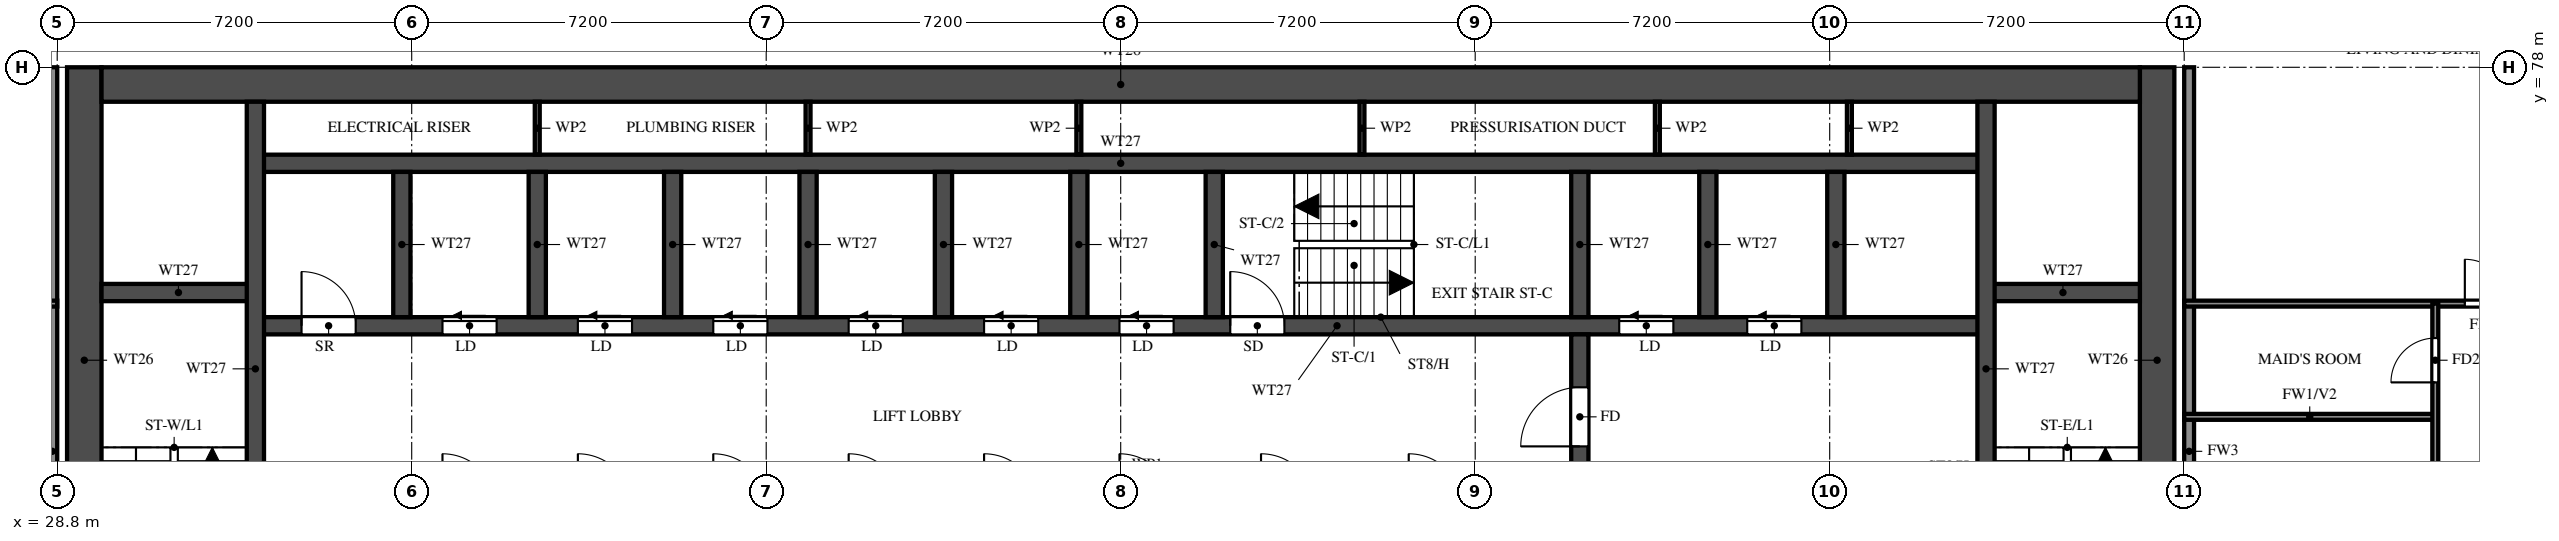
"""IFC4 building model, lengths in metres.
Left out: names, types, materials, properties, quantities, classifications, styles, units other than length and angle.
Written with IfcOpenShell. Run it as: python <this file> out.ifc"""

import sys

from ifc_helpers import new_model, si_unit, direction, frame, frame_2d, origin, place, context, subcontext, project, spatial, rectangle, extrude, element, fill, save


model = new_model("IFC4")
c1 = context("Model", 3, precision=1e-05, world=origin(), true_north=direction((0.0, 1.0)))
c2 = subcontext(c1, "Body", "Model", "MODEL_VIEW")
j1 = project(units=[si_unit("LENGTHUNIT", "METRE"), si_unit("PLANEANGLEUNIT", "RADIAN")], contexts=[c1])
p1 = place(None, origin())
s1 = spatial("IfcSite", under=j1, at=p1, CompositionType="ELEMENT")
p2 = place(p1, origin())
s2 = spatial("IfcBuilding", under=s1, at=p2, CompositionType="ELEMENT")
p3 = place(p2, frame((0.0, 0.0, 143.0)))
s3 = spatial("IfcBuildingStorey", under=s2, at=p3, CompositionType="ELEMENT", Elevation=143.0)
for number, where, z_axis, x_axis in (
    (1, (29.35, 66.1, 0.0), (0.0, 0.0, 1.0), (0.0, 1.0, 0.0)),
    (2, (71.45, 66.1, 0.0), (0.0, 0.0, 1.0), (0.0, 1.0, 0.0)),
):
    element("IfcWall", number, at=place(p3, frame(where, z_axis=z_axis, x_axis=x_axis)), inside=s3, PredefinedType="SHEAR", context=c2, shape_type="SweptSolid", body=[
        extrude(rectangle(XDim=11.9, YDim=0.7, at=frame_2d((5.95, 0.0))), origin(), (0.0, 0.0, 1.0), 3.2),
    ])
p4 = place(p3, frame((29.7, 77.65, 0.0), z_axis=(0.0, 0.0, 1.0), x_axis=(1.0, 0.0, 0.0)))
e3 = element("IfcWall", 3, at=p4, inside=s3, PredefinedType="SHEAR", context=c2, shape_type="SweptSolid", body=[
    extrude(rectangle(XDim=41.4, YDim=0.7, at=frame_2d((20.7, 0.0))), origin(), (0.0, 0.0, 1.0), 3.2),
])
p5 = place(p3, frame((32.825, 72.75, 0.0), z_axis=(0.0, 0.0, 1.0), x_axis=(1.0, 0.0, 0.0)))
e4 = element("IfcWall", 4, at=p5, inside=s3, PredefinedType="SHEAR", context=c2, shape_type="SweptSolid", body=[
    extrude(rectangle(XDim=35.15, YDim=0.35, at=frame_2d((17.575, 0.0))), origin(), (0.0, 0.0, 1.0), 3.2),
])
p6 = place(p5, frame((19.8, 0.0, 0.0)))
e5 = element("IfcOpeningElement", 5, at=p6, cuts=e4, PredefinedType="OPENING", context=c2, shape_type="SweptSolid", body=[
    extrude(rectangle(XDim=1.1, YDim=2.1, at=frame_2d((0.55, 1.05))), frame((0.0, 0.185, 0.0), z_axis=(0.0, -1.0, 0.0), x_axis=(1.0, 0.0, 0.0)), (0.0, 0.0, 1.0), 0.37),
])
p7 = place(p5, frame((27.7, 0.0, 0.0)))
e6 = element("IfcOpeningElement", 6, at=p7, cuts=e4, PredefinedType="OPENING", context=c2, shape_type="SweptSolid", body=[
    extrude(rectangle(XDim=1.1, YDim=2.1, at=frame_2d((0.55, 1.05))), frame((0.0, 0.185, 0.0), z_axis=(0.0, -1.0, 0.0), x_axis=(1.0, 0.0, 0.0)), (0.0, 0.0, 1.0), 0.37),
])
p8 = place(p5, frame((30.3, 0.0, 0.0)))
e7 = element("IfcOpeningElement", 7, at=p8, cuts=e4, PredefinedType="OPENING", context=c2, shape_type="SweptSolid", body=[
    extrude(rectangle(XDim=1.1, YDim=2.1, at=frame_2d((0.55, 1.05))), frame((0.0, 0.185, 0.0), z_axis=(0.0, -1.0, 0.0), x_axis=(1.0, 0.0, 0.0)), (0.0, 0.0, 1.0), 0.37),
])
p9 = place(p5, frame((3.8, 0.0, 0.0)))
e8 = element("IfcOpeningElement", 8, at=p9, cuts=e4, PredefinedType="OPENING", context=c2, shape_type="SweptSolid", body=[
    extrude(rectangle(XDim=1.1, YDim=2.1, at=frame_2d((0.55, 1.05))), frame((0.0, 0.185, 0.0), z_axis=(0.0, -1.0, 0.0), x_axis=(1.0, 0.0, 0.0)), (0.0, 0.0, 1.0), 0.37),
])
p10 = place(p5, frame((6.55, 0.0, 0.0)))
e9 = element("IfcOpeningElement", 9, at=p10, cuts=e4, PredefinedType="OPENING", context=c2, shape_type="SweptSolid", body=[
    extrude(rectangle(XDim=1.1, YDim=2.1, at=frame_2d((0.55, 1.05))), frame((0.0, 0.185, 0.0), z_axis=(0.0, -1.0, 0.0), x_axis=(1.0, 0.0, 0.0)), (0.0, 0.0, 1.0), 0.37),
])
p11 = place(p5, frame((9.3, 0.0, 0.0)))
e10 = element("IfcOpeningElement", 10, at=p11, cuts=e4, PredefinedType="OPENING", context=c2, shape_type="SweptSolid", body=[
    extrude(rectangle(XDim=1.1, YDim=2.1, at=frame_2d((0.55, 1.05))), frame((0.0, 0.185, 0.0), z_axis=(0.0, -1.0, 0.0), x_axis=(1.0, 0.0, 0.0)), (0.0, 0.0, 1.0), 0.37),
])
p12 = place(p5, frame((12.05, 0.0, 0.0)))
e11 = element("IfcOpeningElement", 11, at=p12, cuts=e4, PredefinedType="OPENING", context=c2, shape_type="SweptSolid", body=[
    extrude(rectangle(XDim=1.1, YDim=2.1, at=frame_2d((0.55, 1.05))), frame((0.0, 0.185, 0.0), z_axis=(0.0, -1.0, 0.0), x_axis=(1.0, 0.0, 0.0)), (0.0, 0.0, 1.0), 0.37),
])
p13 = place(p5, frame((14.8, 0.0, 0.0)))
e12 = element("IfcOpeningElement", 12, at=p13, cuts=e4, PredefinedType="OPENING", context=c2, shape_type="SweptSolid", body=[
    extrude(rectangle(XDim=1.1, YDim=2.1, at=frame_2d((0.55, 1.05))), frame((0.0, 0.185, 0.0), z_axis=(0.0, -1.0, 0.0), x_axis=(1.0, 0.0, 0.0)), (0.0, 0.0, 1.0), 0.37),
])
p14 = place(p5, frame((17.55, 0.0, 0.0)))
e13 = element("IfcOpeningElement", 13, at=p14, cuts=e4, PredefinedType="OPENING", context=c2, shape_type="SweptSolid", body=[
    extrude(rectangle(XDim=1.1, YDim=2.1, at=frame_2d((0.55, 1.05))), frame((0.0, 0.185, 0.0), z_axis=(0.0, -1.0, 0.0), x_axis=(1.0, 0.0, 0.0)), (0.0, 0.0, 1.0), 0.37),
])
p15 = place(p5, frame((0.938, 0.0, 0.0)))
e14 = element("IfcOpeningElement", 14, at=p15, cuts=e4, PredefinedType="OPENING", context=c2, shape_type="SweptSolid", body=[
    extrude(rectangle(XDim=1.1, YDim=2.1, at=frame_2d((0.55, 1.05))), frame((0.0, 0.185, 0.0), z_axis=(0.0, -1.0, 0.0), x_axis=(1.0, 0.0, 0.0)), (0.0, 0.0, 1.0), 0.37),
])
p16 = place(p3, frame((32.825, 76.05, 0.0), z_axis=(0.0, 0.0, 1.0), x_axis=(1.0, 0.0, 0.0)))
e15 = element("IfcWall", 15, at=p16, inside=s3, PredefinedType="SHEAR", context=c2, shape_type="SweptSolid", body=[
    extrude(rectangle(XDim=35.15, YDim=0.35, at=frame_2d((17.575, 0.0))), origin(), (0.0, 0.0, 1.0), 3.2),
])
for number, where, z_axis, x_axis in (
    (16, (29.7, 73.425, 0.0), (0.0, 0.0, 1.0), (1.0, 0.0, 0.0)),
    (17, (67.975, 73.425, 0.0), (0.0, 0.0, 1.0), (1.0, 0.0, 0.0)),
):
    element("IfcWall", number, at=place(p3, frame(where, z_axis=z_axis, x_axis=x_axis)), inside=s3, PredefinedType="SHEAR", context=c2, shape_type="SweptSolid", body=[
        extrude(rectangle(XDim=3.125, YDim=0.35, at=frame_2d((1.562, 0.0))), origin(), (0.0, 0.0, 1.0), 3.2),
    ])
p17 = place(p3, frame((32.825, 66.45, 0.0), z_axis=(0.0, 0.0, 1.0), x_axis=(0.0, 1.0, 0.0)))
e18 = element("IfcWall", 18, at=p17, inside=s3, PredefinedType="SHEAR", context=c2, shape_type="SweptSolid", body=[
    extrude(rectangle(XDim=10.85, YDim=0.35, at=frame_2d((5.425, 0.0))), origin(), (0.0, 0.0, 1.0), 3.2),
])
p18 = place(p3, frame((67.975, 66.45, 0.0), z_axis=(0.0, 0.0, 1.0), x_axis=(0.0, 1.0, 0.0)))
e19 = element("IfcWall", 19, at=p18, inside=s3, PredefinedType="SHEAR", context=c2, shape_type="SweptSolid", body=[
    extrude(rectangle(XDim=10.85, YDim=0.35, at=frame_2d((5.425, 0.0))), origin(), (0.0, 0.0, 1.0), 3.2),
])
p19 = place(p18, frame((0.15, 0.0, 0.0)))
e20 = element("IfcOpeningElement", 20, at=p19, cuts=e19, PredefinedType="OPENING", context=c2, shape_type="SweptSolid", body=[
    extrude(rectangle(XDim=1.1, YDim=2.1, at=frame_2d((0.55, 1.05))), frame((0.0, 0.185, 0.0), z_axis=(0.0, -1.0, 0.0), x_axis=(1.0, 0.0, 0.0)), (0.0, 0.0, 1.0), 0.37),
])
p20 = place(p3, frame((59.725, 66.45, 0.0), z_axis=(0.0, 0.0, 1.0), x_axis=(0.0, 1.0, 0.0)))
e21 = element("IfcWall", 21, at=p20, inside=s3, PredefinedType="SHEAR", context=c2, shape_type="SweptSolid", body=[
    extrude(rectangle(XDim=6.125, YDim=0.35, at=frame_2d((3.062, 0.0))), origin(), (0.0, 0.0, 1.0), 3.2),
])
p21 = place(p20, frame((3.85, 0.0, 0.0)))
e22 = element("IfcOpeningElement", 22, at=p21, cuts=e21, PredefinedType="OPENING", context=c2, shape_type="SweptSolid", body=[
    extrude(rectangle(XDim=1.2, YDim=2.1, at=frame_2d((0.6, 1.05))), frame((0.0, 0.185, 0.0), z_axis=(0.0, -1.0, 0.0), x_axis=(1.0, 0.0, 0.0)), (0.0, 0.0, 1.0), 0.37),
])
for number, where, z_axis, x_axis in (
    (23, (59.725, 72.925, 0.0), (0.0, 0.0, 1.0), (0.0, 1.0, 0.0)),
    (24, (35.8, 72.925, 0.0), (0.0, 0.0, 1.0), (0.0, 1.0, 0.0)),
    (25, (38.55, 72.925, 0.0), (0.0, 0.0, 1.0), (0.0, 1.0, 0.0)),
    (26, (41.3, 72.925, 0.0), (0.0, 0.0, 1.0), (0.0, 1.0, 0.0)),
    (27, (44.05, 72.925, 0.0), (0.0, 0.0, 1.0), (0.0, 1.0, 0.0)),
    (28, (46.8, 72.925, 0.0), (0.0, 0.0, 1.0), (0.0, 1.0, 0.0)),
    (29, (49.55, 72.925, 0.0), (0.0, 0.0, 1.0), (0.0, 1.0, 0.0)),
    (30, (52.3, 72.925, 0.0), (0.0, 0.0, 1.0), (0.0, 1.0, 0.0)),
    (31, (62.325, 72.925, 0.0), (0.0, 0.0, 1.0), (0.0, 1.0, 0.0)),
    (32, (64.925, 72.925, 0.0), (0.0, 0.0, 1.0), (0.0, 1.0, 0.0)),
):
    element("IfcWall", number, at=place(p3, frame(where, z_axis=z_axis, x_axis=x_axis)), inside=s3, PredefinedType="SHEAR", context=c2, shape_type="SweptSolid", body=[
        extrude(rectangle(XDim=2.95, YDim=0.35, at=frame_2d((1.475, 0.0))), origin(), (0.0, 0.0, 1.0), 3.2),
    ])
for number, where, z_axis, x_axis in (
    (33, (38.55, 76.225, 0.0), (0.0, 0.0, 1.0), (0.0, 1.0, 0.0)),
    (34, (44.05, 76.225, 0.0), (0.0, 0.0, 1.0), (0.0, 1.0, 0.0)),
    (35, (49.55, 76.225, 0.0), (0.0, 0.0, 1.0), (0.0, 1.0, 0.0)),
    (36, (55.3, 76.225, 0.0), (0.0, 0.0, 1.0), (0.0, 1.0, 0.0)),
    (37, (61.3, 76.225, 0.0), (0.0, 0.0, 1.0), (0.0, 1.0, 0.0)),
    (38, (65.2, 76.225, 0.0), (0.0, 0.0, 1.0), (0.0, 1.0, 0.0)),
):
    element("IfcWall", number, at=place(p3, frame(where, z_axis=z_axis, x_axis=x_axis)), inside=s3, PredefinedType="PARTITIONING", context=c2, shape_type="SweptSolid", body=[
        extrude(rectangle(XDim=1.075, YDim=0.1, at=frame_2d((0.538, 0.0))), origin(), (0.0, 0.0, 1.0), 3.2),
    ])
for number, where, z_axis, x_axis in (
    (39, (28.7, 62.4, 0.0), (0.0, 0.0, 1.0), (0.0, 1.0, 0.0)),
    (40, (72.1, 62.4, 0.0), (0.0, 0.0, 1.0), (0.0, 1.0, 0.0)),
):
    element("IfcWall", number, at=place(p3, frame(where, z_axis=z_axis, x_axis=x_axis)), inside=s3, PredefinedType="SOLIDWALL", context=c2, shape_type="SweptSolid", body=[
        extrude(rectangle(XDim=15.6, YDim=0.2, at=frame_2d((7.8, 0.0))), origin(), (0.0, 0.0, 1.0), 3.2),
    ])
p22 = place(p3, frame((72.0, 70.9, 0.0), z_axis=(0.0, 0.0, 1.0), x_axis=(1.0, 0.0, 0.0)))
e41 = element("IfcWall", 41, at=p22, inside=s3, PredefinedType="PARTITIONING", context=c2, shape_type="SweptSolid", body=[
    extrude(rectangle(XDim=5.1, YDim=0.12, at=frame_2d((2.55, 0.0))), origin(), (0.0, 0.0, 1.0), 3.2),
])
p23 = place(p3, frame((14.525, 73.2, 0.0), z_axis=(0.0, 0.0, 1.0), x_axis=(1.0, 0.0, 0.0)))
e42 = element("IfcWall", 42, at=p23, inside=s3, PredefinedType="PARTITIONING", context=c2, shape_type="SweptSolid", body=[
    extrude(rectangle(XDim=14.275, YDim=0.12, at=frame_2d((7.138, 0.0))), origin(), (0.0, 0.0, 1.0), 2.3),
])
p24 = place(p23, frame((7.675, 0.0, 0.0)))
e43 = element("IfcOpeningElement", 43, at=p24, cuts=e42, PredefinedType="OPENING", context=c2, shape_type="SweptSolid", body=[
    extrude(rectangle(XDim=0.9, YDim=2.1, at=frame_2d((0.45, 1.05))), frame((0.0, 0.07, 0.0), z_axis=(0.0, -1.0, 0.0), x_axis=(1.0, 0.0, 0.0)), (0.0, 0.0, 1.0), 0.14),
])
p25 = place(p3, frame((72.0, 73.2, 0.0), z_axis=(0.0, 0.0, 1.0), x_axis=(1.0, 0.0, 0.0)))
e44 = element("IfcWall", 44, at=p25, inside=s3, PredefinedType="PARTITIONING", context=c2, shape_type="SweptSolid", body=[
    extrude(rectangle(XDim=14.275, YDim=0.12, at=frame_2d((7.137, 0.0))), origin(), (0.0, 0.0, 1.0), 2.3),
])
p26 = place(p25, frame((5.7, 0.0, 0.0)))
e45 = element("IfcOpeningElement", 45, at=p26, cuts=e44, PredefinedType="OPENING", context=c2, shape_type="SweptSolid", body=[
    extrude(rectangle(XDim=0.9, YDim=2.1, at=frame_2d((0.45, 1.05))), frame((0.0, 0.07, 0.0), z_axis=(0.0, -1.0, 0.0), x_axis=(1.0, 0.0, 0.0)), (0.0, 0.0, 1.0), 0.14),
])
p27 = place(p3, frame((77.1, 61.2, 0.0), z_axis=(0.0, 0.0, 1.0), x_axis=(0.0, 1.0, 0.0)))
e46 = element("IfcWall", 46, at=p27, inside=s3, PredefinedType="PARTITIONING", context=c2, shape_type="SweptSolid", body=[
    extrude(rectangle(XDim=12.0, YDim=0.12, at=frame_2d((6.0, 0.0))), origin(), (0.0, 0.0, 1.0), 3.2),
])
p28 = place(p27, frame((5.45, 0.0, 0.0)))
e47 = element("IfcOpeningElement", 47, at=p28, cuts=e46, PredefinedType="OPENING", context=c2, shape_type="SweptSolid", body=[
    extrude(rectangle(XDim=0.8, YDim=2.1, at=frame_2d((0.4, 1.05))), frame((0.0, 0.07, 0.0), z_axis=(0.0, -1.0, 0.0), x_axis=(1.0, 0.0, 0.0)), (0.0, 0.0, 1.0), 0.14),
])
p29 = place(p27, frame((7.975, 0.0, 0.0)))
e48 = element("IfcOpeningElement", 48, at=p29, cuts=e46, PredefinedType="OPENING", context=c2, shape_type="SweptSolid", body=[
    extrude(rectangle(XDim=0.8, YDim=2.1, at=frame_2d((0.4, 1.05))), frame((0.0, 0.07, 0.0), z_axis=(0.0, -1.0, 0.0), x_axis=(1.0, 0.0, 0.0)), (0.0, 0.0, 1.0), 0.14),
])
p30 = place(p27, frame((10.4, 0.0, 0.0)))
e49 = element("IfcOpeningElement", 49, at=p30, cuts=e46, PredefinedType="OPENING", context=c2, shape_type="SweptSolid", body=[
    extrude(rectangle(XDim=0.9, YDim=2.1, at=frame_2d((0.45, 1.05))), frame((0.0, 0.07, 0.0), z_axis=(0.0, -1.0, 0.0), x_axis=(1.0, 0.0, 0.0)), (0.0, 0.0, 1.0), 0.14),
])
p31 = place(p6, origin())
e50 = element("IfcDoor", 50, at=p31, inside=s3, OperationType="SINGLE_SWING_LEFT", PredefinedType="DOOR", context=c2, shape_type="SweptSolid", body=[
    extrude(rectangle(XDim=1.1, YDim=2.1, at=frame_2d((0.55, 1.05))), frame((0.0, 0.025, 0.0), z_axis=(0.0, -1.0, 0.0), x_axis=(1.0, 0.0, 0.0)), (0.0, 0.0, 1.0), 0.05),
])
fill(e5, e50)
p32 = place(p21, origin())
e51 = element("IfcDoor", 51, at=p32, inside=s3, OperationType="SINGLE_SWING_LEFT", PredefinedType="DOOR", context=c2, shape_type="SweptSolid", body=[
    extrude(rectangle(XDim=1.2, YDim=2.1, at=frame_2d((0.6, 1.05))), frame((0.0, 0.025, 0.0), z_axis=(0.0, -1.0, 0.0), x_axis=(1.0, 0.0, 0.0)), (0.0, 0.0, 1.0), 0.05),
])
fill(e22, e51)
p33 = place(p7, origin())
e52 = element("IfcDoor", 52, at=p33, inside=s3, OperationType="SLIDING_TO_LEFT", PredefinedType="DOOR", context=c2, shape_type="SweptSolid", body=[
    extrude(rectangle(XDim=1.1, YDim=2.1, at=frame_2d((0.55, 1.05))), frame((0.0, 0.025, 0.0), z_axis=(0.0, -1.0, 0.0), x_axis=(1.0, 0.0, 0.0)), (0.0, 0.0, 1.0), 0.05),
])
fill(e6, e52)
p34 = place(p8, origin())
e53 = element("IfcDoor", 53, at=p34, inside=s3, OperationType="SLIDING_TO_LEFT", PredefinedType="DOOR", context=c2, shape_type="SweptSolid", body=[
    extrude(rectangle(XDim=1.1, YDim=2.1, at=frame_2d((0.55, 1.05))), frame((0.0, 0.025, 0.0), z_axis=(0.0, -1.0, 0.0), x_axis=(1.0, 0.0, 0.0)), (0.0, 0.0, 1.0), 0.05),
])
fill(e7, e53)
p35 = place(p9, origin())
e54 = element("IfcDoor", 54, at=p35, inside=s3, OperationType="SLIDING_TO_LEFT", PredefinedType="DOOR", context=c2, shape_type="SweptSolid", body=[
    extrude(rectangle(XDim=1.1, YDim=2.1, at=frame_2d((0.55, 1.05))), frame((0.0, 0.025, 0.0), z_axis=(0.0, -1.0, 0.0), x_axis=(1.0, 0.0, 0.0)), (0.0, 0.0, 1.0), 0.05),
])
fill(e8, e54)
p36 = place(p10, origin())
e55 = element("IfcDoor", 55, at=p36, inside=s3, OperationType="SLIDING_TO_LEFT", PredefinedType="DOOR", context=c2, shape_type="SweptSolid", body=[
    extrude(rectangle(XDim=1.1, YDim=2.1, at=frame_2d((0.55, 1.05))), frame((0.0, 0.025, 0.0), z_axis=(0.0, -1.0, 0.0), x_axis=(1.0, 0.0, 0.0)), (0.0, 0.0, 1.0), 0.05),
])
fill(e9, e55)
p37 = place(p11, origin())
e56 = element("IfcDoor", 56, at=p37, inside=s3, OperationType="SLIDING_TO_LEFT", PredefinedType="DOOR", context=c2, shape_type="SweptSolid", body=[
    extrude(rectangle(XDim=1.1, YDim=2.1, at=frame_2d((0.55, 1.05))), frame((0.0, 0.025, 0.0), z_axis=(0.0, -1.0, 0.0), x_axis=(1.0, 0.0, 0.0)), (0.0, 0.0, 1.0), 0.05),
])
fill(e10, e56)
p38 = place(p12, origin())
e57 = element("IfcDoor", 57, at=p38, inside=s3, OperationType="SLIDING_TO_LEFT", PredefinedType="DOOR", context=c2, shape_type="SweptSolid", body=[
    extrude(rectangle(XDim=1.1, YDim=2.1, at=frame_2d((0.55, 1.05))), frame((0.0, 0.025, 0.0), z_axis=(0.0, -1.0, 0.0), x_axis=(1.0, 0.0, 0.0)), (0.0, 0.0, 1.0), 0.05),
])
fill(e11, e57)
p39 = place(p13, origin())
e58 = element("IfcDoor", 58, at=p39, inside=s3, OperationType="SLIDING_TO_LEFT", PredefinedType="DOOR", context=c2, shape_type="SweptSolid", body=[
    extrude(rectangle(XDim=1.1, YDim=2.1, at=frame_2d((0.55, 1.05))), frame((0.0, 0.025, 0.0), z_axis=(0.0, -1.0, 0.0), x_axis=(1.0, 0.0, 0.0)), (0.0, 0.0, 1.0), 0.05),
])
fill(e12, e58)
p40 = place(p14, origin())
e59 = element("IfcDoor", 59, at=p40, inside=s3, OperationType="SLIDING_TO_LEFT", PredefinedType="DOOR", context=c2, shape_type="SweptSolid", body=[
    extrude(rectangle(XDim=1.1, YDim=2.1, at=frame_2d((0.55, 1.05))), frame((0.0, 0.025, 0.0), z_axis=(0.0, -1.0, 0.0), x_axis=(1.0, 0.0, 0.0)), (0.0, 0.0, 1.0), 0.05),
])
fill(e13, e59)
p41 = place(p15, origin())
e60 = element("IfcDoor", 60, at=p41, inside=s3, OperationType="SINGLE_SWING_LEFT", PredefinedType="DOOR", context=c2, shape_type="SweptSolid", body=[
    extrude(rectangle(XDim=1.1, YDim=2.1, at=frame_2d((0.55, 1.05))), frame((0.0, 0.025, 0.0), z_axis=(0.0, -1.0, 0.0), x_axis=(1.0, 0.0, 0.0)), (0.0, 0.0, 1.0), 0.05),
])
fill(e14, e60)
p42 = place(p26, origin())
e61 = element("IfcDoor", 61, at=p42, inside=s3, OperationType="SINGLE_SWING_RIGHT", PredefinedType="DOOR", context=c2, shape_type="SweptSolid", body=[
    extrude(rectangle(XDim=0.9, YDim=2.1, at=frame_2d((0.45, 1.05))), frame((0.0, 0.025, 0.0), z_axis=(0.0, -1.0, 0.0), x_axis=(1.0, 0.0, 0.0)), (0.0, 0.0, 1.0), 0.05),
])
fill(e45, e61)
p43 = place(p30, origin())
e62 = element("IfcDoor", 62, at=p43, inside=s3, OperationType="SINGLE_SWING_LEFT", PredefinedType="DOOR", context=c2, shape_type="SweptSolid", body=[
    extrude(rectangle(XDim=0.9, YDim=2.1, at=frame_2d((0.45, 1.05))), frame((0.0, 0.025, 0.0), z_axis=(0.0, -1.0, 0.0), x_axis=(1.0, 0.0, 0.0)), (0.0, 0.0, 1.0), 0.05),
])
fill(e49, e62)
save(model, sys.argv[1])
